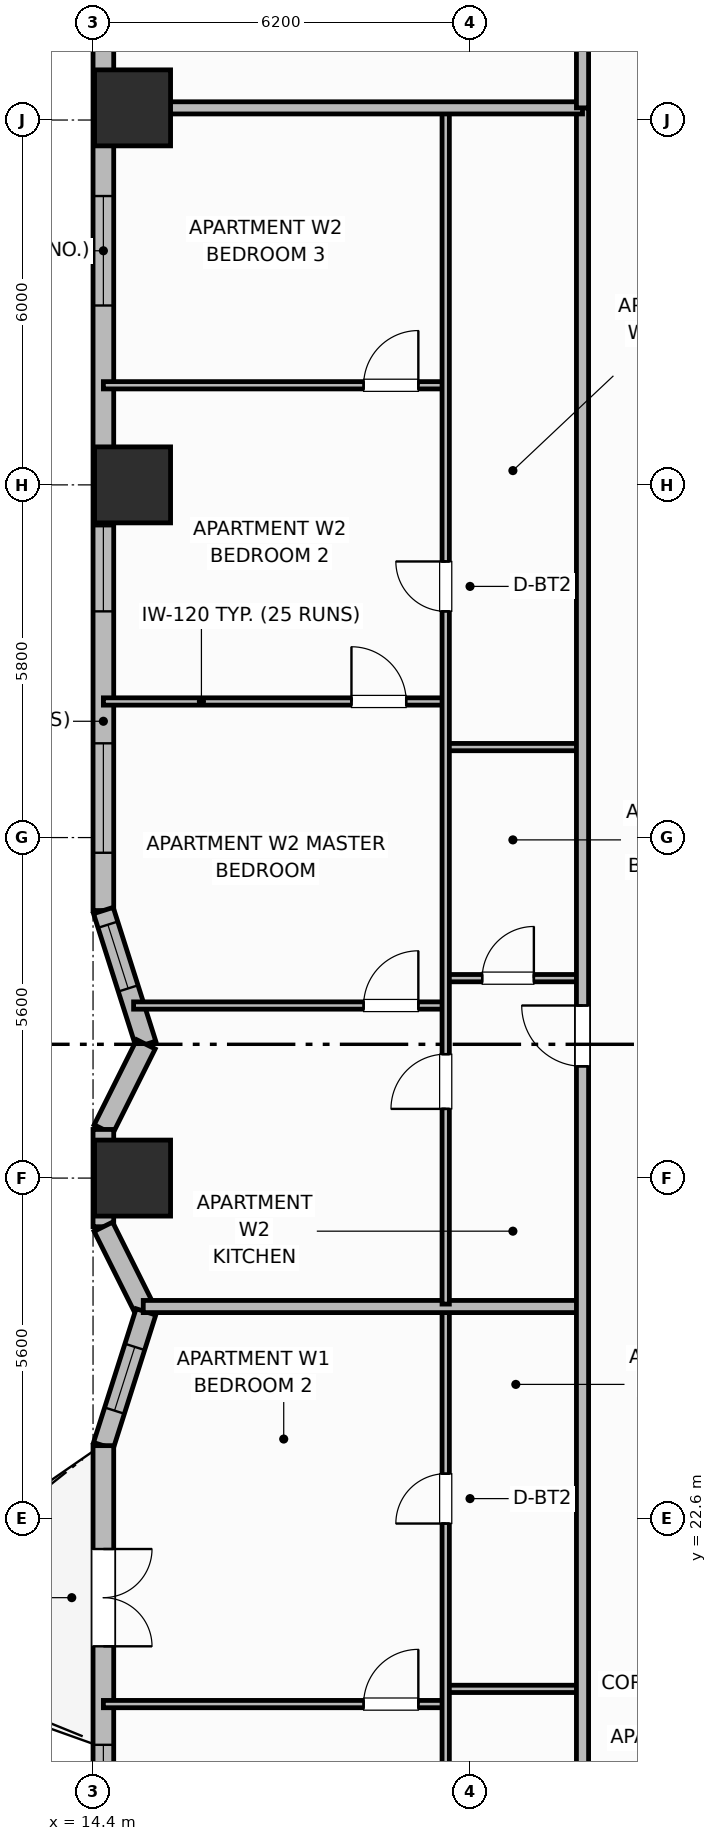
"""IFC4 building model, lengths in metres.
Left out: names, types, materials, properties, quantities, classifications, styles, units other than length and angle.
Written with IfcOpenShell. Run it as: python <this file> out.ifc"""

import sys

from ifc_helpers import new_model, si_unit, direction, frame, frame_2d, origin, origin_2d, place, context, subcontext, project, spatial, rectangle, extrude, element, fill, save


model = new_model("IFC4")
c1 = context("Model", 3, precision=1e-05, world=origin(), true_north=direction((0.0, 1.0)))
c2 = subcontext(c1, "Body", "Model", "MODEL_VIEW")
j1 = project(units=[si_unit("LENGTHUNIT", "METRE"), si_unit("PLANEANGLEUNIT", "RADIAN")], contexts=[c1])
p1 = place(None, origin())
s1 = spatial("IfcSite", under=j1, at=p1, CompositionType="ELEMENT")
p2 = place(p1, origin())
s2 = spatial("IfcBuilding", under=s1, at=p2, CompositionType="ELEMENT")
p3 = place(p2, frame((0.0, 0.0, 65.8)))
s3 = spatial("IfcBuildingStorey", under=s2, at=p3, CompositionType="ELEMENT", Elevation=65.8)
for number, where, z_axis, x_axis in (
    (1, (15.05, 28.2, 0.0), (0.0, 0.0, 1.0), (1.0, 0.0, 0.0)),
    (2, (15.05, 39.6, 0.0), (0.0, 0.0, 1.0), (1.0, 0.0, 0.0)),
    (3, (15.05, 45.8, 0.0), (0.0, 0.0, 1.0), (1.0, 0.0, 0.0)),
):
    element("IfcColumn", number, at=place(p3, frame(where, z_axis=z_axis, x_axis=x_axis)), inside=s3, PredefinedType="COLUMN", context=c2, shape_type="SweptSolid", body=[
        extrude(rectangle(XDim=1.25, YDim=1.25, at=origin_2d()), origin(), (0.0, 0.0, 1.0), 3.7),
    ])
p4 = place(p3, frame((14.57, 47.4, 0.0), z_axis=(0.0, 0.0, 1.0), x_axis=(0.0, -1.0, 0.0)))
e4 = element("IfcWall", 4, at=p4, inside=s3, PredefinedType="SOLIDWALL", context=c2, shape_type="SweptSolid", body=[
    extrude(rectangle(XDim=14.8, YDim=0.34, at=frame_2d((7.4, 0.0))), origin(), (0.0, 0.0, 1.0), 2.7),
])
p5 = place(p4, frame((3.05, 0.0, 0.73)))
e5 = element("IfcOpeningElement", 5, at=p5, cuts=e4, PredefinedType="OPENING", context=c2, shape_type="SweptSolid", body=[
    extrude(rectangle(XDim=1.8, YDim=1.85, at=frame_2d((0.9, 0.925))), frame((0.0, 0.18, 0.0), z_axis=(0.0, -1.0, 0.0), x_axis=(1.0, 0.0, 0.0)), (0.0, 0.0, 1.0), 0.36),
])
p6 = place(p4, frame((8.48, 0.0, 0.69)))
e6 = element("IfcOpeningElement", 6, at=p6, cuts=e4, PredefinedType="OPENING", context=c2, shape_type="SweptSolid", body=[
    extrude(rectangle(XDim=1.4, YDim=1.85, at=frame_2d((0.7, 0.925))), frame((0.0, 0.18, 0.0), z_axis=(0.0, -1.0, 0.0), x_axis=(1.0, 0.0, 0.0)), (0.0, 0.0, 1.0), 0.36),
])
p7 = place(p4, frame((12.05, 0.0, 0.73)))
e7 = element("IfcOpeningElement", 7, at=p7, cuts=e4, PredefinedType="OPENING", context=c2, shape_type="SweptSolid", body=[
    extrude(rectangle(XDim=1.8, YDim=1.85, at=frame_2d((0.9, 0.925))), frame((0.0, 0.18, 0.0), z_axis=(0.0, -1.0, 0.0), x_axis=(1.0, 0.0, 0.0)), (0.0, 0.0, 1.0), 0.36),
])
p8 = place(p3, frame((14.57, 32.6, 0.0), z_axis=(0.0, 0.0, 1.0), x_axis=(0.303160011437, -0.952939666225, 0.0)))
e8 = element("IfcWall", 8, at=p8, inside=s3, PredefinedType="SOLIDWALL", context=c2, shape_type="SweptSolid", body=[
    extrude(rectangle(XDim=2.309, YDim=0.34, at=frame_2d((1.154, 0.0))), origin(), (0.0, 0.0, 1.0), 2.7),
])
p9 = place(p8, frame((0.244, 0.0, 0.89)))
e9 = element("IfcOpeningElement", 9, at=p9, cuts=e8, PredefinedType="OPENING", context=c2, shape_type="SweptSolid", body=[
    extrude(rectangle(XDim=1.1, YDim=1.65, at=frame_2d((0.55, 0.825))), frame((0.0, 0.18, 0.0), z_axis=(0.0, -1.0, 0.0), x_axis=(1.0, 0.0, 0.0)), (0.0, 0.0, 1.0), 0.36),
])
p10 = place(p3, frame((15.27, 30.4, 0.0), z_axis=(0.0, 0.0, 1.0), x_axis=(-0.4472135955, -0.894427191, 0.0)))
e10 = element("IfcWall", 10, at=p10, inside=s3, PredefinedType="SOLIDWALL", context=c2, shape_type="SweptSolid", body=[
    extrude(rectangle(XDim=1.565, YDim=0.34, at=frame_2d((0.783, 0.0))), origin(), (0.0, 0.0, 1.0), 2.7),
])
p11 = place(p3, frame((14.57, 29.0, 0.0), z_axis=(0.0, 0.0, 1.0), x_axis=(0.0, -1.0, 0.0)))
e11 = element("IfcWall", 11, at=p11, inside=s3, PredefinedType="SOLIDWALL", context=c2, shape_type="SweptSolid", body=[
    extrude(rectangle(XDim=1.6, YDim=0.34, at=frame_2d((0.8, 0.0))), origin(), (0.0, 0.0, 1.0), 2.7),
])
p12 = place(p3, frame((14.57, 27.4, 0.0), z_axis=(0.0, 0.0, 1.0), x_axis=(0.4472135955, -0.894427191, 0.0)))
e12 = element("IfcWall", 12, at=p12, inside=s3, PredefinedType="SOLIDWALL", context=c2, shape_type="SweptSolid", body=[
    extrude(rectangle(XDim=1.565, YDim=0.34, at=frame_2d((0.783, 0.0))), origin(), (0.0, 0.0, 1.0), 2.7),
])
p13 = place(p3, frame((15.27, 26.0, 0.0), z_axis=(0.0, 0.0, 1.0), x_axis=(-0.303190562272, -0.952929946507, 0.0)))
e13 = element("IfcWall", 13, at=p13, inside=s3, PredefinedType="SOLIDWALL", context=c2, shape_type="SweptSolid", body=[
    extrude(rectangle(XDim=2.309, YDim=0.34, at=frame_2d((1.154, 0.0))), origin(), (0.0, 0.0, 1.0), 2.7),
])
p14 = place(p13, frame((0.604, 0.0, 0.89)))
e14 = element("IfcOpeningElement", 14, at=p14, cuts=e13, PredefinedType="OPENING", context=c2, shape_type="SweptSolid", body=[
    extrude(rectangle(XDim=1.1, YDim=1.65, at=frame_2d((0.55, 0.825))), frame((0.0, 0.18, 0.0), z_axis=(0.0, -1.0, 0.0), x_axis=(1.0, 0.0, 0.0)), (0.0, 0.0, 1.0), 0.36),
])
p15 = place(p3, frame((14.57, 23.8, 0.0), z_axis=(0.0, 0.0, 1.0), x_axis=(0.0, -1.0, 0.0)))
e15 = element("IfcWall", 15, at=p15, inside=s3, PredefinedType="SOLIDWALL", context=c2, shape_type="SweptSolid", body=[
    extrude(rectangle(XDim=14.8, YDim=0.34, at=frame_2d((7.4, 0.0))), origin(), (0.0, 0.0, 1.0), 2.7),
])
p16 = place(p15, frame((1.7, 0.0, 0.0)))
e16 = element("IfcOpeningElement", 16, at=p16, cuts=e15, PredefinedType="OPENING", context=c2, shape_type="SweptSolid", body=[
    extrude(rectangle(XDim=1.6, YDim=2.1, at=frame_2d((0.8, 1.05))), frame((0.0, 0.18, 0.0), z_axis=(0.0, -1.0, 0.0), x_axis=(1.0, 0.0, 0.0)), (0.0, 0.0, 1.0), 0.36),
])
p17 = place(p15, frame((4.92, 0.0, 0.69)))
e17 = element("IfcOpeningElement", 17, at=p17, cuts=e15, PredefinedType="OPENING", context=c2, shape_type="SweptSolid", body=[
    extrude(rectangle(XDim=1.4, YDim=1.85, at=frame_2d((0.7, 0.925))), frame((0.0, 0.18, 0.0), z_axis=(0.0, -1.0, 0.0), x_axis=(1.0, 0.0, 0.0)), (0.0, 0.0, 1.0), 0.36),
])
p18 = place(p15, frame((9.337, 0.0, 0.68)))
e18 = element("IfcOpeningElement", 18, at=p18, cuts=e15, PredefinedType="OPENING", context=c2, shape_type="SweptSolid", body=[
    extrude(rectangle(XDim=1.6, YDim=1.9, at=frame_2d((0.8, 0.95))), frame((0.0, 0.18, 0.0), z_axis=(0.0, -1.0, 0.0), x_axis=(1.0, 0.0, 0.0)), (0.0, 0.0, 1.0), 0.36),
])
p19 = place(p3, frame((20.2, 19.8, 0.0), z_axis=(0.0, 0.0, 1.0), x_axis=(1.0, 0.0, 0.0)))
e19 = element("IfcWall", 19, at=p19, inside=s3, PredefinedType="PARTITIONING", context=c2, shape_type="SweptSolid", body=[
    extrude(rectangle(XDim=2.25, YDim=0.12, at=frame_2d((1.125, 0.0))), origin(), (0.0, 0.0, 1.0), 2.53),
])
p20 = place(p3, frame((14.57, 19.55, 0.0), z_axis=(0.0, 0.0, 1.0), x_axis=(1.0, 0.0, 0.0)))
e20 = element("IfcWall", 20, at=p20, inside=s3, PredefinedType="PARTITIONING", context=c2, shape_type="SweptSolid", body=[
    extrude(rectangle(XDim=5.63, YDim=0.12, at=frame_2d((2.815, 0.0))), origin(), (0.0, 0.0, 1.0), 2.53),
])
p21 = place(p20, frame((4.28, 0.0, 0.0)))
e21 = element("IfcOpeningElement", 21, at=p21, cuts=e20, PredefinedType="OPENING", context=c2, shape_type="SweptSolid", body=[
    extrude(rectangle(XDim=0.9, YDim=2.1, at=frame_2d((0.45, 1.05))), frame((0.0, 0.07, 0.0), z_axis=(0.0, -1.0, 0.0), x_axis=(1.0, 0.0, 0.0)), (0.0, 0.0, 1.0), 0.14),
])
p22 = place(p3, frame((20.2, 10.64, 0.0), z_axis=(0.0, 0.0, 1.0), x_axis=(0.0, 1.0, 0.0)))
e22 = element("IfcWall", 22, at=p22, inside=s3, PredefinedType="PARTITIONING", context=c2, shape_type="SweptSolid", body=[
    extrude(rectangle(XDim=15.408, YDim=0.12, at=frame_2d((7.704, 0.0))), origin(), (0.0, 0.0, 1.0), 2.53),
])
p23 = place(p22, frame((0.41, 0.0, 0.0)))
e23 = element("IfcOpeningElement", 23, at=p23, cuts=e22, PredefinedType="OPENING", context=c2, shape_type="SweptSolid", body=[
    extrude(rectangle(XDim=0.9, YDim=2.1, at=frame_2d((0.45, 1.05))), frame((0.0, 0.07, 0.0), z_axis=(0.0, -1.0, 0.0), x_axis=(1.0, 0.0, 0.0)), (0.0, 0.0, 1.0), 0.14),
])
p24 = place(p22, frame((11.879, 0.0, 0.0)))
e24 = element("IfcOpeningElement", 24, at=p24, cuts=e22, PredefinedType="OPENING", context=c2, shape_type="SweptSolid", body=[
    extrude(rectangle(XDim=0.82, YDim=2.08, at=frame_2d((0.41, 1.04))), frame((0.0, 0.07, 0.0), z_axis=(0.0, -1.0, 0.0), x_axis=(1.0, 0.0, 0.0)), (0.0, 0.0, 1.0), 0.14),
])
p25 = place(p3, frame((15.226, 26.088, 0.0), z_axis=(0.0, 0.0, 1.0), x_axis=(1.0, 0.0, 0.0)))
e25 = element("IfcWall", 25, at=p25, inside=s3, PredefinedType="PARTITIONING", context=c2, shape_type="SweptSolid", body=[
    extrude(rectangle(XDim=7.224, YDim=0.2, at=frame_2d((3.612, 0.0))), origin(), (0.0, 0.0, 1.0), 2.53),
])
p26 = place(p3, frame((20.2, 31.488, 0.0), z_axis=(0.0, 0.0, 1.0), x_axis=(1.0, 0.0, 0.0)))
e26 = element("IfcWall", 26, at=p26, inside=s3, PredefinedType="PARTITIONING", context=c2, shape_type="SweptSolid", body=[
    extrude(rectangle(XDim=2.25, YDim=0.12, at=frame_2d((1.125, 0.0))), origin(), (0.0, 0.0, 1.0), 2.53),
])
p27 = place(p26, frame((0.6, 0.0, 0.0)))
e27 = element("IfcOpeningElement", 27, at=p27, cuts=e26, PredefinedType="OPENING", context=c2, shape_type="SweptSolid", body=[
    extrude(rectangle(XDim=0.85, YDim=2.1, at=frame_2d((0.425, 1.05))), frame((0.0, 0.07, 0.0), z_axis=(0.0, -1.0, 0.0), x_axis=(1.0, 0.0, 0.0)), (0.0, 0.0, 1.0), 0.14),
])
p28 = place(p3, frame((20.2, 35.288, 0.0), z_axis=(0.0, 0.0, 1.0), x_axis=(1.0, 0.0, 0.0)))
e28 = element("IfcWall", 28, at=p28, inside=s3, PredefinedType="PARTITIONING", context=c2, shape_type="SweptSolid", body=[
    extrude(rectangle(XDim=2.25, YDim=0.12, at=frame_2d((1.125, 0.0))), origin(), (0.0, 0.0, 1.0), 2.53),
])
p29 = place(p3, frame((15.067, 31.038, 0.0), z_axis=(0.0, 0.0, 1.0), x_axis=(1.0, 0.0, 0.0)))
e29 = element("IfcWall", 29, at=p29, inside=s3, PredefinedType="PARTITIONING", context=c2, shape_type="SweptSolid", body=[
    extrude(rectangle(XDim=5.133, YDim=0.12, at=frame_2d((2.566, 0.0))), origin(), (0.0, 0.0, 1.0), 2.53),
])
p30 = place(p29, frame((3.783, 0.0, 0.0)))
e30 = element("IfcOpeningElement", 30, at=p30, cuts=e29, PredefinedType="OPENING", context=c2, shape_type="SweptSolid", body=[
    extrude(rectangle(XDim=0.9, YDim=2.1, at=frame_2d((0.45, 1.05))), frame((0.0, 0.07, 0.0), z_axis=(0.0, -1.0, 0.0), x_axis=(1.0, 0.0, 0.0)), (0.0, 0.0, 1.0), 0.14),
])
p31 = place(p3, frame((14.57, 36.038, 0.0), z_axis=(0.0, 0.0, 1.0), x_axis=(1.0, 0.0, 0.0)))
e31 = element("IfcWall", 31, at=p31, inside=s3, PredefinedType="PARTITIONING", context=c2, shape_type="SweptSolid", body=[
    extrude(rectangle(XDim=5.63, YDim=0.12, at=frame_2d((2.815, 0.0))), origin(), (0.0, 0.0, 1.0), 2.53),
])
p32 = place(p31, frame((4.08, 0.0, 0.0)))
e32 = element("IfcOpeningElement", 32, at=p32, cuts=e31, PredefinedType="OPENING", context=c2, shape_type="SweptSolid", body=[
    extrude(rectangle(XDim=0.9, YDim=2.1, at=frame_2d((0.45, 1.05))), frame((0.0, 0.07, 0.0), z_axis=(0.0, -1.0, 0.0), x_axis=(1.0, 0.0, 0.0)), (0.0, 0.0, 1.0), 0.14),
])
p33 = place(p3, frame((14.57, 41.238, 0.0), z_axis=(0.0, 0.0, 1.0), x_axis=(1.0, 0.0, 0.0)))
e33 = element("IfcWall", 33, at=p33, inside=s3, PredefinedType="PARTITIONING", context=c2, shape_type="SweptSolid", body=[
    extrude(rectangle(XDim=5.63, YDim=0.12, at=frame_2d((2.815, 0.0))), origin(), (0.0, 0.0, 1.0), 2.53),
])
p34 = place(p33, frame((4.28, 0.0, 0.0)))
e34 = element("IfcOpeningElement", 34, at=p34, cuts=e33, PredefinedType="OPENING", context=c2, shape_type="SweptSolid", body=[
    extrude(rectangle(XDim=0.9, YDim=2.1, at=frame_2d((0.45, 1.05))), frame((0.0, 0.07, 0.0), z_axis=(0.0, -1.0, 0.0), x_axis=(1.0, 0.0, 0.0)), (0.0, 0.0, 1.0), 0.14),
])
p35 = place(p3, frame((20.2, 26.128, 0.0), z_axis=(0.0, 0.0, 1.0), x_axis=(0.0, 1.0, 0.0)))
e35 = element("IfcWall", 35, at=p35, inside=s3, PredefinedType="PARTITIONING", context=c2, shape_type="SweptSolid", body=[
    extrude(rectangle(XDim=19.632, YDim=0.12, at=frame_2d((9.816, 0.0))), origin(), (0.0, 0.0, 1.0), 2.53),
])
p36 = place(p35, frame((3.21, 0.0, 0.0)))
e36 = element("IfcOpeningElement", 36, at=p36, cuts=e35, PredefinedType="OPENING", context=c2, shape_type="SweptSolid", body=[
    extrude(rectangle(XDim=0.9, YDim=2.1, at=frame_2d((0.45, 1.05))), frame((0.0, 0.07, 0.0), z_axis=(0.0, -1.0, 0.0), x_axis=(1.0, 0.0, 0.0)), (0.0, 0.0, 1.0), 0.14),
])
p37 = place(p35, frame((11.392, 0.0, 0.0)))
e37 = element("IfcOpeningElement", 37, at=p37, cuts=e35, PredefinedType="OPENING", context=c2, shape_type="SweptSolid", body=[
    extrude(rectangle(XDim=0.82, YDim=2.08, at=frame_2d((0.41, 1.04))), frame((0.0, 0.07, 0.0), z_axis=(0.0, -1.0, 0.0), x_axis=(1.0, 0.0, 0.0)), (0.0, 0.0, 1.0), 0.14),
])
p38 = place(p3, frame((22.45, 10.6, 0.0), z_axis=(0.0, 0.0, 1.0), x_axis=(0.0, 1.0, 0.0)))
e38 = element("IfcWall", 38, at=p38, inside=s3, PredefinedType="PARTITIONING", context=c2, shape_type="SweptSolid", body=[
    extrude(rectangle(XDim=35.2, YDim=0.2, at=frame_2d((17.6, 0.0))), origin(), (0.0, 0.0, 1.0), 2.53),
])
p39 = place(p38, frame((2.65, 0.0, 0.0)))
e39 = element("IfcOpeningElement", 39, at=p39, cuts=e38, PredefinedType="OPENING", context=c2, shape_type="SweptSolid", body=[
    extrude(rectangle(XDim=1.0, YDim=2.15, at=frame_2d((0.5, 1.075))), frame((0.0, 0.11, 0.0), z_axis=(0.0, -1.0, 0.0), x_axis=(1.0, 0.0, 0.0)), (0.0, 0.0, 1.0), 0.22),
])
p40 = place(p38, frame((19.438, 0.0, 0.0)))
e40 = element("IfcOpeningElement", 40, at=p40, cuts=e38, PredefinedType="OPENING", context=c2, shape_type="SweptSolid", body=[
    extrude(rectangle(XDim=1.0, YDim=2.15, at=frame_2d((0.5, 1.075))), frame((0.0, 0.11, 0.0), z_axis=(0.0, -1.0, 0.0), x_axis=(1.0, 0.0, 0.0)), (0.0, 0.0, 1.0), 0.22),
])
p41 = place(p3, frame((14.99, 45.8, 0.0), z_axis=(0.0, 0.0, 1.0), x_axis=(1.0, 0.0, 0.0)))
e41 = element("IfcWall", 41, at=p41, inside=s3, PredefinedType="PARTITIONING", context=c2, shape_type="SweptSolid", body=[
    extrude(rectangle(XDim=7.46, YDim=0.2, at=frame_2d((3.73, 0.0))), origin(), (0.0, 0.0, 1.0), 2.53),
])
p42 = place(p3, frame((22.45, 45.8, 0.0), z_axis=(0.0, 0.0, 1.0), x_axis=(0.0, 1.0, 0.0)))
e42 = element("IfcWall", 42, at=p42, inside=s3, PredefinedType="PARTITIONING", context=c2, shape_type="SweptSolid", body=[
    extrude(rectangle(XDim=5.63, YDim=0.2, at=frame_2d((2.815, 0.0))), origin(), (0.0, 0.0, 1.0), 2.53),
])
p43 = place(p5, origin())
e43 = element("IfcWindow", 43, at=p43, inside=s3, PartitioningType="SINGLE_PANEL", PredefinedType="WINDOW", context=c2, shape_type="SweptSolid", body=[
    extrude(rectangle(XDim=1.8, YDim=1.85, at=frame_2d((0.9, 0.925))), frame((0.0, 0.03, 0.0), z_axis=(0.0, -1.0, 0.0), x_axis=(1.0, 0.0, 0.0)), (0.0, 0.0, 1.0), 0.06),
])
fill(e5, e43)
p44 = place(p6, origin())
e44 = element("IfcWindow", 44, at=p44, inside=s3, PartitioningType="SINGLE_PANEL", PredefinedType="WINDOW", context=c2, shape_type="SweptSolid", body=[
    extrude(rectangle(XDim=1.4, YDim=1.85, at=frame_2d((0.7, 0.925))), frame((0.0, 0.03, 0.0), z_axis=(0.0, -1.0, 0.0), x_axis=(1.0, 0.0, 0.0)), (0.0, 0.0, 1.0), 0.06),
])
fill(e6, e44)
p45 = place(p7, origin())
e45 = element("IfcWindow", 45, at=p45, inside=s3, PartitioningType="SINGLE_PANEL", PredefinedType="WINDOW", context=c2, shape_type="SweptSolid", body=[
    extrude(rectangle(XDim=1.8, YDim=1.85, at=frame_2d((0.9, 0.925))), frame((0.0, 0.03, 0.0), z_axis=(0.0, -1.0, 0.0), x_axis=(1.0, 0.0, 0.0)), (0.0, 0.0, 1.0), 0.06),
])
fill(e7, e45)
p46 = place(p9, origin())
e46 = element("IfcWindow", 46, at=p46, inside=s3, PartitioningType="SINGLE_PANEL", PredefinedType="WINDOW", context=c2, shape_type="SweptSolid", body=[
    extrude(rectangle(XDim=1.1, YDim=1.65, at=frame_2d((0.55, 0.825))), frame((0.0, 0.03, 0.0), z_axis=(0.0, -1.0, 0.0), x_axis=(1.0, 0.0, 0.0)), (0.0, 0.0, 1.0), 0.06),
])
fill(e9, e46)
p47 = place(p14, origin())
e47 = element("IfcWindow", 47, at=p47, inside=s3, PartitioningType="SINGLE_PANEL", PredefinedType="WINDOW", context=c2, shape_type="SweptSolid", body=[
    extrude(rectangle(XDim=1.1, YDim=1.65, at=frame_2d((0.55, 0.825))), frame((0.0, 0.03, 0.0), z_axis=(0.0, -1.0, 0.0), x_axis=(1.0, 0.0, 0.0)), (0.0, 0.0, 1.0), 0.06),
])
fill(e14, e47)
p48 = place(p16, origin())
e48 = element("IfcDoor", 48, at=p48, inside=s3, OperationType="DOUBLE_DOOR_SINGLE_SWING", PredefinedType="DOOR", context=c2, shape_type="SweptSolid", body=[
    extrude(rectangle(XDim=1.6, YDim=2.1, at=frame_2d((0.8, 1.05))), frame((0.0, 0.025, 0.0), z_axis=(0.0, -1.0, 0.0), x_axis=(1.0, 0.0, 0.0)), (0.0, 0.0, 1.0), 0.05),
])
fill(e16, e48)
p49 = place(p17, origin())
e49 = element("IfcWindow", 49, at=p49, inside=s3, PartitioningType="SINGLE_PANEL", PredefinedType="WINDOW", context=c2, shape_type="SweptSolid", body=[
    extrude(rectangle(XDim=1.4, YDim=1.85, at=frame_2d((0.7, 0.925))), frame((0.0, 0.03, 0.0), z_axis=(0.0, -1.0, 0.0), x_axis=(1.0, 0.0, 0.0)), (0.0, 0.0, 1.0), 0.06),
])
fill(e17, e49)
p50 = place(p21, origin())
e50 = element("IfcDoor", 50, at=p50, inside=s3, OperationType="SINGLE_SWING_RIGHT", PredefinedType="DOOR", context=c2, shape_type="SweptSolid", body=[
    extrude(rectangle(XDim=0.9, YDim=2.1, at=frame_2d((0.45, 1.05))), frame((0.0, 0.025, 0.0), z_axis=(0.0, -1.0, 0.0), x_axis=(1.0, 0.0, 0.0)), (0.0, 0.0, 1.0), 0.05),
])
fill(e21, e50)
p51 = place(p24, origin())
e51 = element("IfcDoor", 51, at=p51, inside=s3, OperationType="SINGLE_SWING_LEFT", PredefinedType="DOOR", context=c2, shape_type="SweptSolid", body=[
    extrude(rectangle(XDim=0.82, YDim=2.08, at=frame_2d((0.41, 1.04))), frame((0.0, 0.025, 0.0), z_axis=(0.0, -1.0, 0.0), x_axis=(1.0, 0.0, 0.0)), (0.0, 0.0, 1.0), 0.05),
])
fill(e24, e51)
p52 = place(p27, origin())
e52 = element("IfcDoor", 52, at=p52, inside=s3, OperationType="SINGLE_SWING_RIGHT", PredefinedType="DOOR", context=c2, shape_type="SweptSolid", body=[
    extrude(rectangle(XDim=0.85, YDim=2.1, at=frame_2d((0.425, 1.05))), frame((0.0, 0.025, 0.0), z_axis=(0.0, -1.0, 0.0), x_axis=(1.0, 0.0, 0.0)), (0.0, 0.0, 1.0), 0.05),
])
fill(e27, e52)
p53 = place(p30, origin())
e53 = element("IfcDoor", 53, at=p53, inside=s3, OperationType="SINGLE_SWING_RIGHT", PredefinedType="DOOR", context=c2, shape_type="SweptSolid", body=[
    extrude(rectangle(XDim=0.9, YDim=2.1, at=frame_2d((0.45, 1.05))), frame((0.0, 0.025, 0.0), z_axis=(0.0, -1.0, 0.0), x_axis=(1.0, 0.0, 0.0)), (0.0, 0.0, 1.0), 0.05),
])
fill(e30, e53)
p54 = place(p32, origin())
e54 = element("IfcDoor", 54, at=p54, inside=s3, OperationType="SINGLE_SWING_LEFT", PredefinedType="DOOR", context=c2, shape_type="SweptSolid", body=[
    extrude(rectangle(XDim=0.9, YDim=2.1, at=frame_2d((0.45, 1.05))), frame((0.0, 0.025, 0.0), z_axis=(0.0, -1.0, 0.0), x_axis=(1.0, 0.0, 0.0)), (0.0, 0.0, 1.0), 0.05),
])
fill(e32, e54)
p55 = place(p34, origin())
e55 = element("IfcDoor", 55, at=p55, inside=s3, OperationType="SINGLE_SWING_RIGHT", PredefinedType="DOOR", context=c2, shape_type="SweptSolid", body=[
    extrude(rectangle(XDim=0.9, YDim=2.1, at=frame_2d((0.45, 1.05))), frame((0.0, 0.025, 0.0), z_axis=(0.0, -1.0, 0.0), x_axis=(1.0, 0.0, 0.0)), (0.0, 0.0, 1.0), 0.05),
])
fill(e34, e55)
p56 = place(p36, origin())
e56 = element("IfcDoor", 56, at=p56, inside=s3, OperationType="SINGLE_SWING_LEFT", PredefinedType="DOOR", context=c2, shape_type="SweptSolid", body=[
    extrude(rectangle(XDim=0.9, YDim=2.1, at=frame_2d((0.45, 1.05))), frame((0.0, 0.025, 0.0), z_axis=(0.0, -1.0, 0.0), x_axis=(1.0, 0.0, 0.0)), (0.0, 0.0, 1.0), 0.05),
])
fill(e36, e56)
p57 = place(p37, origin())
e57 = element("IfcDoor", 57, at=p57, inside=s3, OperationType="SINGLE_SWING_RIGHT", PredefinedType="DOOR", context=c2, shape_type="SweptSolid", body=[
    extrude(rectangle(XDim=0.82, YDim=2.08, at=frame_2d((0.41, 1.04))), frame((0.0, 0.025, 0.0), z_axis=(0.0, -1.0, 0.0), x_axis=(1.0, 0.0, 0.0)), (0.0, 0.0, 1.0), 0.05),
])
fill(e37, e57)
p58 = place(p40, origin())
e58 = element("IfcDoor", 58, at=p58, inside=s3, OperationType="SINGLE_SWING_RIGHT", PredefinedType="DOOR", context=c2, shape_type="SweptSolid", body=[
    extrude(rectangle(XDim=1.0, YDim=2.15, at=frame_2d((0.5, 1.075))), frame((0.0, 0.025, 0.0), z_axis=(0.0, -1.0, 0.0), x_axis=(1.0, 0.0, 0.0)), (0.0, 0.0, 1.0), 0.05),
])
fill(e40, e58)
save(model, sys.argv[1])
